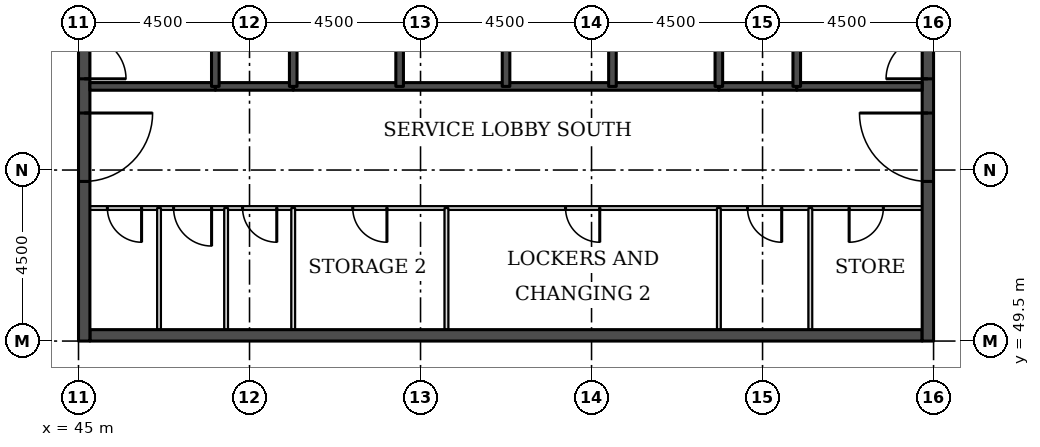
"""IFC4 building model, lengths in metres.
Left out: names, types, materials, properties, quantities, classifications, styles, units other than length and angle.
Written with IfcOpenShell. Run it as: python <this file> out.ifc"""

import sys

from ifc_helpers import new_model, si_unit, direction, frame, frame_2d, origin, place, context, subcontext, project, spatial, rectangle, extrude, element, fill, save


model = new_model("IFC4")
c1 = context("Model", 3, precision=1e-05, world=origin(), true_north=direction((0.0, 1.0)))
c2 = subcontext(c1, "Body", "Model", "MODEL_VIEW")
j1 = project(units=[si_unit("LENGTHUNIT", "METRE"), si_unit("PLANEANGLEUNIT", "RADIAN")], contexts=[c1])
p1 = place(None, origin())
s1 = spatial("IfcSite", under=j1, at=p1, CompositionType="ELEMENT")
p2 = place(p1, origin())
s2 = spatial("IfcBuilding", under=s1, at=p2, CompositionType="ELEMENT")
p3 = place(p2, frame((0.0, 0.0, 263.7)))
s3 = spatial("IfcBuildingStorey", under=s2, at=p3, CompositionType="ELEMENT", Elevation=263.7)
p4 = place(p3, frame((45.3, 49.65, 0.0), z_axis=(0.0, 0.0, 1.0), x_axis=(1.0, 0.0, 0.0)))
e1 = element("IfcWall", 1, at=p4, inside=s3, PredefinedType="SHEAR", context=c2, shape_type="SweptSolid", body=[
    extrude(rectangle(XDim=21.9, YDim=0.3, at=frame_2d((10.95, 0.0))), origin(), (0.0, 0.0, 1.0), 5.0),
])
p5 = place(p3, frame((45.15, 49.5, 0.0), z_axis=(0.0, 0.0, 1.0), x_axis=(0.0, 1.0, 0.0)))
e2 = element("IfcWall", 2, at=p5, inside=s3, PredefinedType="SHEAR", context=c2, shape_type="SweptSolid", body=[
    extrude(rectangle(XDim=22.5, YDim=0.3, at=frame_2d((11.25, 0.0))), origin(), (0.0, 0.0, 1.0), 5.0),
])
p6 = place(p5, frame((4.2, 0.0, 0.0)))
e3 = element("IfcOpeningElement", 3, at=p6, cuts=e2, PredefinedType="OPENING", context=c2, shape_type="SweptSolid", body=[
    extrude(rectangle(XDim=1.8, YDim=2.1, at=frame_2d((0.9, 1.05))), frame((0.0, 0.16, 0.0), z_axis=(0.0, -1.0, 0.0), x_axis=(1.0, 0.0, 0.0)), (0.0, 0.0, 1.0), 0.32),
])
p7 = place(p5, frame((6.9, 0.0, 0.0)))
e4 = element("IfcOpeningElement", 4, at=p7, cuts=e2, PredefinedType="OPENING", context=c2, shape_type="SweptSolid", body=[
    extrude(rectangle(XDim=1.1, YDim=2.1, at=frame_2d((0.55, 1.05))), frame((0.0, 0.16, 0.0), z_axis=(0.0, -1.0, 0.0), x_axis=(1.0, 0.0, 0.0)), (0.0, 0.0, 1.0), 0.32),
])
p8 = place(p5, frame((13.6, 0.0, 0.0)))
e5 = element("IfcOpeningElement", 5, at=p8, cuts=e2, PredefinedType="OPENING", context=c2, shape_type="SweptSolid", body=[
    extrude(rectangle(XDim=1.1, YDim=2.1, at=frame_2d((0.55, 1.05))), frame((0.0, 0.16, 0.0), z_axis=(0.0, -1.0, 0.0), x_axis=(1.0, 0.0, 0.0)), (0.0, 0.0, 1.0), 0.32),
])
p9 = place(p5, frame((16.5, 0.0, 0.0)))
e6 = element("IfcOpeningElement", 6, at=p9, cuts=e2, PredefinedType="OPENING", context=c2, shape_type="SweptSolid", body=[
    extrude(rectangle(XDim=1.8, YDim=2.1, at=frame_2d((0.9, 1.05))), frame((0.0, 0.16, 0.0), z_axis=(0.0, -1.0, 0.0), x_axis=(1.0, 0.0, 0.0)), (0.0, 0.0, 1.0), 0.32),
])
p10 = place(p3, frame((67.35, 49.5, 0.0), z_axis=(0.0, 0.0, 1.0), x_axis=(0.0, 1.0, 0.0)))
e7 = element("IfcWall", 7, at=p10, inside=s3, PredefinedType="SHEAR", context=c2, shape_type="SweptSolid", body=[
    extrude(rectangle(XDim=22.5, YDim=0.3, at=frame_2d((11.25, 0.0))), origin(), (0.0, 0.0, 1.0), 5.0),
])
p11 = place(p10, frame((4.2, 0.0, 0.0)))
e8 = element("IfcOpeningElement", 8, at=p11, cuts=e7, PredefinedType="OPENING", context=c2, shape_type="SweptSolid", body=[
    extrude(rectangle(XDim=1.8, YDim=2.1, at=frame_2d((0.9, 1.05))), frame((0.0, 0.16, 0.0), z_axis=(0.0, -1.0, 0.0), x_axis=(1.0, 0.0, 0.0)), (0.0, 0.0, 1.0), 0.32),
])
p12 = place(p10, frame((6.9, 0.0, 0.0)))
e9 = element("IfcOpeningElement", 9, at=p12, cuts=e7, PredefinedType="OPENING", context=c2, shape_type="SweptSolid", body=[
    extrude(rectangle(XDim=1.1, YDim=2.1, at=frame_2d((0.55, 1.05))), frame((0.0, 0.16, 0.0), z_axis=(0.0, -1.0, 0.0), x_axis=(1.0, 0.0, 0.0)), (0.0, 0.0, 1.0), 0.32),
])
p13 = place(p10, frame((13.6, 0.0, 0.0)))
e10 = element("IfcOpeningElement", 10, at=p13, cuts=e7, PredefinedType="OPENING", context=c2, shape_type="SweptSolid", body=[
    extrude(rectangle(XDim=1.1, YDim=2.1, at=frame_2d((0.55, 1.05))), frame((0.0, 0.16, 0.0), z_axis=(0.0, -1.0, 0.0), x_axis=(1.0, 0.0, 0.0)), (0.0, 0.0, 1.0), 0.32),
])
p14 = place(p10, frame((16.5, 0.0, 0.0)))
e11 = element("IfcOpeningElement", 11, at=p14, cuts=e7, PredefinedType="OPENING", context=c2, shape_type="SweptSolid", body=[
    extrude(rectangle(XDim=1.8, YDim=2.1, at=frame_2d((0.9, 1.05))), frame((0.0, 0.16, 0.0), z_axis=(0.0, -1.0, 0.0), x_axis=(1.0, 0.0, 0.0)), (0.0, 0.0, 1.0), 0.32),
])
p15 = place(p3, frame((45.3, 53.0, 0.0), z_axis=(0.0, 0.0, 1.0), x_axis=(1.0, 0.0, 0.0)))
e12 = element("IfcWall", 12, at=p15, inside=s3, PredefinedType="PARTITIONING", context=c2, shape_type="SweptSolid", body=[
    extrude(rectangle(XDim=21.9, YDim=0.1, at=frame_2d((10.95, 0.0))), origin(), (0.0, 0.0, 1.0), 4.75),
])
p16 = place(p15, frame((19.979, 0.0, 0.0)))
e13 = element("IfcOpeningElement", 13, at=p16, cuts=e12, PredefinedType="OPENING", context=c2, shape_type="SweptSolid", body=[
    extrude(rectangle(XDim=0.9, YDim=2.1, at=frame_2d((0.45, 1.05))), frame((0.0, 0.06, 0.0), z_axis=(0.0, -1.0, 0.0), x_axis=(1.0, 0.0, 0.0)), (0.0, 0.0, 1.0), 0.12),
])
p17 = place(p15, frame((17.304, 0.0, 0.0)))
e14 = element("IfcOpeningElement", 14, at=p17, cuts=e12, PredefinedType="OPENING", context=c2, shape_type="SweptSolid", body=[
    extrude(rectangle(XDim=0.9, YDim=2.1, at=frame_2d((0.45, 1.05))), frame((0.0, 0.06, 0.0), z_axis=(0.0, -1.0, 0.0), x_axis=(1.0, 0.0, 0.0)), (0.0, 0.0, 1.0), 0.12),
])
p18 = place(p15, frame((0.459, 0.0, 0.0)))
e15 = element("IfcOpeningElement", 15, at=p18, cuts=e12, PredefinedType="OPENING", context=c2, shape_type="SweptSolid", body=[
    extrude(rectangle(XDim=0.9, YDim=2.1, at=frame_2d((0.45, 1.05))), frame((0.0, 0.06, 0.0), z_axis=(0.0, -1.0, 0.0), x_axis=(1.0, 0.0, 0.0)), (0.0, 0.0, 1.0), 0.12),
])
p19 = place(p15, frame((2.202, 0.0, 0.0)))
e16 = element("IfcOpeningElement", 16, at=p19, cuts=e12, PredefinedType="OPENING", context=c2, shape_type="SweptSolid", body=[
    extrude(rectangle(XDim=1.0, YDim=2.1, at=frame_2d((0.5, 1.05))), frame((0.0, 0.06, 0.0), z_axis=(0.0, -1.0, 0.0), x_axis=(1.0, 0.0, 0.0)), (0.0, 0.0, 1.0), 0.12),
])
p20 = place(p15, frame((4.017, 0.0, 0.0)))
e17 = element("IfcOpeningElement", 17, at=p20, cuts=e12, PredefinedType="OPENING", context=c2, shape_type="SweptSolid", body=[
    extrude(rectangle(XDim=0.9, YDim=2.1, at=frame_2d((0.45, 1.05))), frame((0.0, 0.06, 0.0), z_axis=(0.0, -1.0, 0.0), x_axis=(1.0, 0.0, 0.0)), (0.0, 0.0, 1.0), 0.12),
])
p21 = place(p15, frame((6.916, 0.0, 0.0)))
e18 = element("IfcOpeningElement", 18, at=p21, cuts=e12, PredefinedType="OPENING", context=c2, shape_type="SweptSolid", body=[
    extrude(rectangle(XDim=0.9, YDim=2.1, at=frame_2d((0.45, 1.05))), frame((0.0, 0.06, 0.0), z_axis=(0.0, -1.0, 0.0), x_axis=(1.0, 0.0, 0.0)), (0.0, 0.0, 1.0), 0.12),
])
p22 = place(p15, frame((12.516, 0.0, 0.0)))
e19 = element("IfcOpeningElement", 19, at=p22, cuts=e12, PredefinedType="OPENING", context=c2, shape_type="SweptSolid", body=[
    extrude(rectangle(XDim=0.9, YDim=2.1, at=frame_2d((0.45, 1.05))), frame((0.0, 0.06, 0.0), z_axis=(0.0, -1.0, 0.0), x_axis=(1.0, 0.0, 0.0)), (0.0, 0.0, 1.0), 0.12),
])
for number, where, z_axis, x_axis in (
    (20, (48.6, 56.2, 0.0), (0.0, 0.0, 1.0), (1.0, 0.0, 0.0)),
    (21, (61.85, 56.2, 0.0), (0.0, 0.0, 1.0), (1.0, 0.0, 0.0)),
):
    element("IfcWall", number, at=place(p3, frame(where, z_axis=z_axis, x_axis=x_axis)), inside=s3, PredefinedType="SOLIDWALL", context=c2, shape_type="SweptSolid", body=[
        extrude(rectangle(XDim=2.05, YDim=0.2, at=frame_2d((1.025, 0.0))), origin(), (0.0, 0.0, 1.0), 4.75),
    ])
p23 = place(p3, frame((45.3, 56.2, 0.0), z_axis=(0.0, 0.0, 1.0), x_axis=(1.0, 0.0, 0.0)))
e22 = element("IfcWall", 22, at=p23, inside=s3, PredefinedType="SOLIDWALL", context=c2, shape_type="SweptSolid", body=[
    extrude(rectangle(XDim=3.3, YDim=0.2, at=frame_2d((1.65, 0.0))), origin(), (0.0, 0.0, 1.0), 4.75),
])
p24 = place(p3, frame((50.65, 56.2, 0.0), z_axis=(0.0, 0.0, 1.0), x_axis=(1.0, 0.0, 0.0)))
e23 = element("IfcWall", 23, at=p24, inside=s3, PredefinedType="SOLIDWALL", context=c2, shape_type="SweptSolid", body=[
    extrude(rectangle(XDim=11.2, YDim=0.2, at=frame_2d((5.6, 0.0))), origin(), (0.0, 0.0, 1.0), 4.75),
])
p25 = place(p3, frame((63.9, 56.2, 0.0), z_axis=(0.0, 0.0, 1.0), x_axis=(1.0, 0.0, 0.0)))
e24 = element("IfcWall", 24, at=p25, inside=s3, PredefinedType="SOLIDWALL", context=c2, shape_type="SweptSolid", body=[
    extrude(rectangle(XDim=3.3, YDim=0.2, at=frame_2d((1.65, 0.0))), origin(), (0.0, 0.0, 1.0), 4.75),
])
p26 = place(p3, frame((47.119, 49.8, 0.0), z_axis=(0.0, 0.0, 1.0), x_axis=(0.0, 1.0, 0.0)))
e25 = element("IfcWall", 25, at=p26, inside=s3, PredefinedType="PARTITIONING", context=c2, shape_type="SweptSolid", body=[
    extrude(rectangle(XDim=3.2, YDim=0.1, at=frame_2d((1.6, 0.0))), origin(), (0.0, 0.0, 1.0), 4.75),
])
p27 = place(p3, frame((48.6, 56.2, 0.0), z_axis=(0.0, 0.0, 1.0), x_axis=(0.0, 1.0, 0.0)))
e26 = element("IfcWall", 26, at=p27, inside=s3, PredefinedType="SOLIDWALL", context=c2, shape_type="SweptSolid", body=[
    extrude(rectangle(XDim=5.8, YDim=0.2, at=frame_2d((2.9, 0.0))), origin(), (0.0, 0.0, 1.0), 4.75),
])
for number, where, z_axis, x_axis in (
    (27, (48.885, 49.8, 0.0), (0.0, 0.0, 1.0), (0.0, 1.0, 0.0)),
    (28, (50.65, 49.8, 0.0), (0.0, 0.0, 1.0), (0.0, 1.0, 0.0)),
):
    element("IfcWall", number, at=place(p3, frame(where, z_axis=z_axis, x_axis=x_axis)), inside=s3, PredefinedType="PARTITIONING", context=c2, shape_type="SweptSolid", body=[
        extrude(rectangle(XDim=3.2, YDim=0.1, at=frame_2d((1.6, 0.0))), origin(), (0.0, 0.0, 1.0), 4.75),
    ])
for number, where, z_axis, x_axis in (
    (29, (50.65, 56.2, 0.0), (0.0, 0.0, 1.0), (0.0, 1.0, 0.0)),
    (30, (53.45, 56.2, 0.0), (0.0, 0.0, 1.0), (0.0, 1.0, 0.0)),
):
    element("IfcWall", number, at=place(p3, frame(where, z_axis=z_axis, x_axis=x_axis)), inside=s3, PredefinedType="SOLIDWALL", context=c2, shape_type="SweptSolid", body=[
        extrude(rectangle(XDim=2.8, YDim=0.2, at=frame_2d((1.4, 0.0))), origin(), (0.0, 0.0, 1.0), 4.75),
    ])
p28 = place(p3, frame((54.682, 49.8, 0.0), z_axis=(0.0, 0.0, 1.0), x_axis=(0.0, 1.0, 0.0)))
e31 = element("IfcWall", 31, at=p28, inside=s3, PredefinedType="PARTITIONING", context=c2, shape_type="SweptSolid", body=[
    extrude(rectangle(XDim=3.2, YDim=0.1, at=frame_2d((1.6, 0.0))), origin(), (0.0, 0.0, 1.0), 4.75),
])
for number, where, z_axis, x_axis in (
    (32, (56.25, 56.2, 0.0), (0.0, 0.0, 1.0), (0.0, 1.0, 0.0)),
    (33, (59.05, 56.2, 0.0), (0.0, 0.0, 1.0), (0.0, 1.0, 0.0)),
):
    element("IfcWall", number, at=place(p3, frame(where, z_axis=z_axis, x_axis=x_axis)), inside=s3, PredefinedType="SOLIDWALL", context=c2, shape_type="SweptSolid", body=[
        extrude(rectangle(XDim=2.8, YDim=0.2, at=frame_2d((1.4, 0.0))), origin(), (0.0, 0.0, 1.0), 4.75),
    ])
p29 = place(p3, frame((61.85, 49.8, 0.0), z_axis=(0.0, 0.0, 1.0), x_axis=(0.0, 1.0, 0.0)))
e34 = element("IfcWall", 34, at=p29, inside=s3, PredefinedType="PARTITIONING", context=c2, shape_type="SweptSolid", body=[
    extrude(rectangle(XDim=3.2, YDim=0.1, at=frame_2d((1.6, 0.0))), origin(), (0.0, 0.0, 1.0), 4.75),
])
p30 = place(p3, frame((61.85, 56.2, 0.0), z_axis=(0.0, 0.0, 1.0), x_axis=(0.0, 1.0, 0.0)))
e35 = element("IfcWall", 35, at=p30, inside=s3, PredefinedType="SOLIDWALL", context=c2, shape_type="SweptSolid", body=[
    extrude(rectangle(XDim=2.8, YDim=0.2, at=frame_2d((1.4, 0.0))), origin(), (0.0, 0.0, 1.0), 4.75),
])
p31 = place(p3, frame((63.9, 56.2, 0.0), z_axis=(0.0, 0.0, 1.0), x_axis=(0.0, 1.0, 0.0)))
e36 = element("IfcWall", 36, at=p31, inside=s3, PredefinedType="SOLIDWALL", context=c2, shape_type="SweptSolid", body=[
    extrude(rectangle(XDim=5.8, YDim=0.2, at=frame_2d((2.9, 0.0))), origin(), (0.0, 0.0, 1.0), 4.75),
])
p32 = place(p3, frame((64.258, 49.8, 0.0), z_axis=(0.0, 0.0, 1.0), x_axis=(0.0, 1.0, 0.0)))
e37 = element("IfcWall", 37, at=p32, inside=s3, PredefinedType="PARTITIONING", context=c2, shape_type="SweptSolid", body=[
    extrude(rectangle(XDim=3.2, YDim=0.1, at=frame_2d((1.6, 0.0))), origin(), (0.0, 0.0, 1.0), 4.75),
])
p33 = place(p6, frame((1.8, 0.0, 0.0), z_axis=(0.0, 0.0, 1.0), x_axis=(-1.0, 0.0, 0.0)))
e38 = element("IfcDoor", 38, at=p33, inside=s3, OperationType="SINGLE_SWING_LEFT", PredefinedType="DOOR", context=c2, shape_type="SweptSolid", body=[
    extrude(rectangle(XDim=1.8, YDim=2.1, at=frame_2d((0.9, 1.05))), frame((0.0, 0.025, 0.0), z_axis=(0.0, -1.0, 0.0), x_axis=(1.0, 0.0, 0.0)), (0.0, 0.0, 1.0), 0.05),
])
fill(e3, e38)
p34 = place(p7, frame((1.1, 0.0, 0.0), z_axis=(0.0, 0.0, 1.0), x_axis=(-1.0, 0.0, 0.0)))
e39 = element("IfcDoor", 39, at=p34, inside=s3, OperationType="SINGLE_SWING_RIGHT", PredefinedType="DOOR", context=c2, shape_type="SweptSolid", body=[
    extrude(rectangle(XDim=1.1, YDim=2.1, at=frame_2d((0.55, 1.05))), frame((0.0, 0.025, 0.0), z_axis=(0.0, -1.0, 0.0), x_axis=(1.0, 0.0, 0.0)), (0.0, 0.0, 1.0), 0.05),
])
fill(e4, e39)
p35 = place(p11, origin())
e40 = element("IfcDoor", 40, at=p35, inside=s3, OperationType="SINGLE_SWING_RIGHT", PredefinedType="DOOR", context=c2, shape_type="SweptSolid", body=[
    extrude(rectangle(XDim=1.8, YDim=2.1, at=frame_2d((0.9, 1.05))), frame((0.0, 0.025, 0.0), z_axis=(0.0, -1.0, 0.0), x_axis=(1.0, 0.0, 0.0)), (0.0, 0.0, 1.0), 0.05),
])
fill(e8, e40)
p36 = place(p12, origin())
e41 = element("IfcDoor", 41, at=p36, inside=s3, OperationType="SINGLE_SWING_LEFT", PredefinedType="DOOR", context=c2, shape_type="SweptSolid", body=[
    extrude(rectangle(XDim=1.1, YDim=2.1, at=frame_2d((0.55, 1.05))), frame((0.0, 0.025, 0.0), z_axis=(0.0, -1.0, 0.0), x_axis=(1.0, 0.0, 0.0)), (0.0, 0.0, 1.0), 0.05),
])
fill(e9, e41)
p37 = place(p16, frame((0.9, 0.0, 0.0), z_axis=(0.0, 0.0, 1.0), x_axis=(-1.0, 0.0, 0.0)))
e42 = element("IfcDoor", 42, at=p37, inside=s3, OperationType="SINGLE_SWING_RIGHT", PredefinedType="DOOR", context=c2, shape_type="SweptSolid", body=[
    extrude(rectangle(XDim=0.9, YDim=2.1, at=frame_2d((0.45, 1.05))), frame((0.0, 0.025, 0.0), z_axis=(0.0, -1.0, 0.0), x_axis=(1.0, 0.0, 0.0)), (0.0, 0.0, 1.0), 0.05),
])
fill(e13, e42)
p38 = place(p17, frame((0.9, 0.0, 0.0), z_axis=(0.0, 0.0, 1.0), x_axis=(-1.0, 0.0, 0.0)))
e43 = element("IfcDoor", 43, at=p38, inside=s3, OperationType="SINGLE_SWING_LEFT", PredefinedType="DOOR", context=c2, shape_type="SweptSolid", body=[
    extrude(rectangle(XDim=0.9, YDim=2.1, at=frame_2d((0.45, 1.05))), frame((0.0, 0.025, 0.0), z_axis=(0.0, -1.0, 0.0), x_axis=(1.0, 0.0, 0.0)), (0.0, 0.0, 1.0), 0.05),
])
fill(e14, e43)
p39 = place(p18, frame((0.9, 0.0, 0.0), z_axis=(0.0, 0.0, 1.0), x_axis=(-1.0, 0.0, 0.0)))
e44 = element("IfcDoor", 44, at=p39, inside=s3, OperationType="SINGLE_SWING_LEFT", PredefinedType="DOOR", context=c2, shape_type="SweptSolid", body=[
    extrude(rectangle(XDim=0.9, YDim=2.1, at=frame_2d((0.45, 1.05))), frame((0.0, 0.025, 0.0), z_axis=(0.0, -1.0, 0.0), x_axis=(1.0, 0.0, 0.0)), (0.0, 0.0, 1.0), 0.05),
])
fill(e15, e44)
p40 = place(p19, frame((1.0, 0.0, 0.0), z_axis=(0.0, 0.0, 1.0), x_axis=(-1.0, 0.0, 0.0)))
e45 = element("IfcDoor", 45, at=p40, inside=s3, OperationType="SINGLE_SWING_LEFT", PredefinedType="DOOR", context=c2, shape_type="SweptSolid", body=[
    extrude(rectangle(XDim=1.0, YDim=2.1, at=frame_2d((0.5, 1.05))), frame((0.0, 0.025, 0.0), z_axis=(0.0, -1.0, 0.0), x_axis=(1.0, 0.0, 0.0)), (0.0, 0.0, 1.0), 0.05),
])
fill(e16, e45)
p41 = place(p20, frame((0.9, 0.0, 0.0), z_axis=(0.0, 0.0, 1.0), x_axis=(-1.0, 0.0, 0.0)))
e46 = element("IfcDoor", 46, at=p41, inside=s3, OperationType="SINGLE_SWING_LEFT", PredefinedType="DOOR", context=c2, shape_type="SweptSolid", body=[
    extrude(rectangle(XDim=0.9, YDim=2.1, at=frame_2d((0.45, 1.05))), frame((0.0, 0.025, 0.0), z_axis=(0.0, -1.0, 0.0), x_axis=(1.0, 0.0, 0.0)), (0.0, 0.0, 1.0), 0.05),
])
fill(e17, e46)
p42 = place(p21, frame((0.9, 0.0, 0.0), z_axis=(0.0, 0.0, 1.0), x_axis=(-1.0, 0.0, 0.0)))
e47 = element("IfcDoor", 47, at=p42, inside=s3, OperationType="SINGLE_SWING_LEFT", PredefinedType="DOOR", context=c2, shape_type="SweptSolid", body=[
    extrude(rectangle(XDim=0.9, YDim=2.1, at=frame_2d((0.45, 1.05))), frame((0.0, 0.025, 0.0), z_axis=(0.0, -1.0, 0.0), x_axis=(1.0, 0.0, 0.0)), (0.0, 0.0, 1.0), 0.05),
])
fill(e18, e47)
p43 = place(p22, frame((0.9, 0.0, 0.0), z_axis=(0.0, 0.0, 1.0), x_axis=(-1.0, 0.0, 0.0)))
e48 = element("IfcDoor", 48, at=p43, inside=s3, OperationType="SINGLE_SWING_LEFT", PredefinedType="DOOR", context=c2, shape_type="SweptSolid", body=[
    extrude(rectangle(XDim=0.9, YDim=2.1, at=frame_2d((0.45, 1.05))), frame((0.0, 0.025, 0.0), z_axis=(0.0, -1.0, 0.0), x_axis=(1.0, 0.0, 0.0)), (0.0, 0.0, 1.0), 0.05),
])
fill(e19, e48)
save(model, sys.argv[1])
